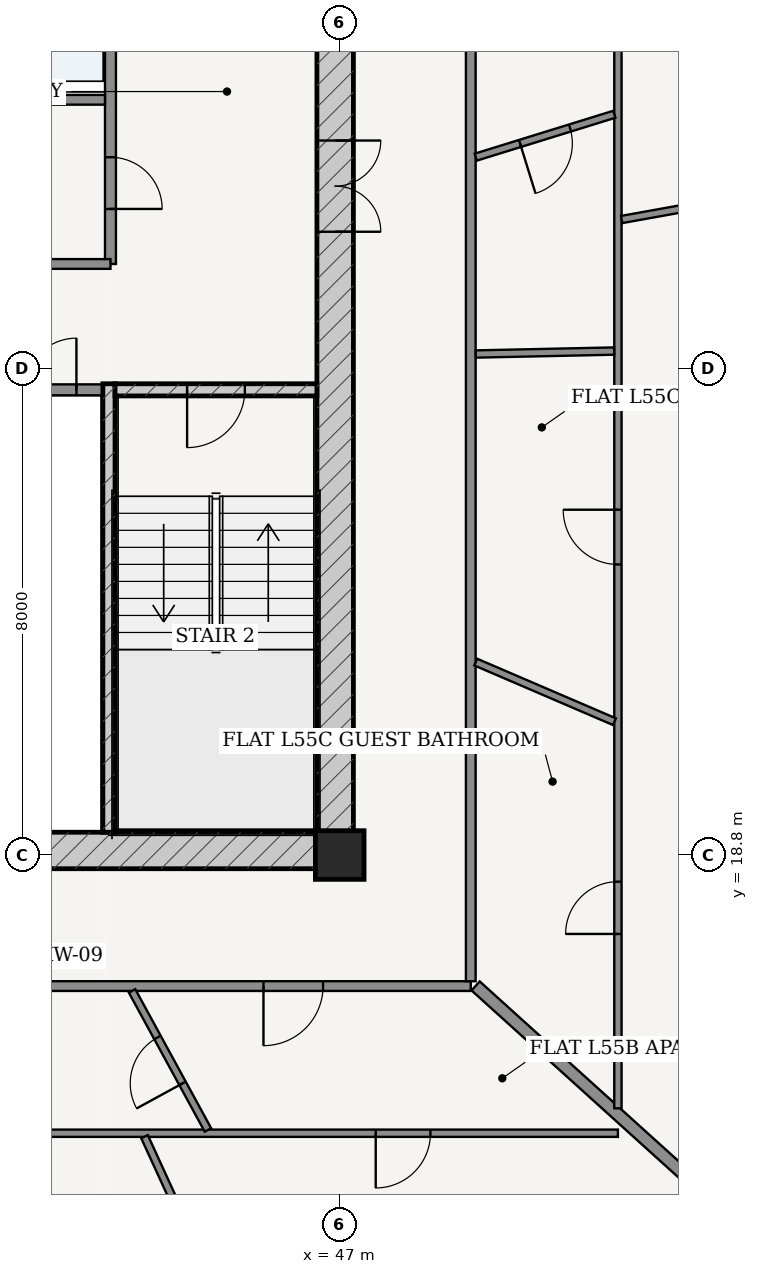
"""IFC4 building model, lengths in metres.
Left out: names, types, materials, properties, quantities, classifications, styles, units other than length and angle.
Written with IfcOpenShell. Run it as: python <this file> out.ifc"""

import sys

from ifc_helpers import new_model, si_unit, direction, frame, frame_2d, origin, origin_2d, place, context, subcontext, project, spatial, rectangle, extrude, source, transform, mapped, element, fill, save


model = new_model("IFC4")
c1 = context("Model", 3, precision=1e-05, world=origin(), true_north=direction((-0.2419218956, 0.970295726276)))
c2 = subcontext(c1, "Body", "Model", "MODEL_VIEW")
j1 = project(units=[si_unit("LENGTHUNIT", "METRE"), si_unit("PLANEANGLEUNIT", "RADIAN")], contexts=[c1])
p1 = place(None, origin())
s1 = spatial("IfcSite", under=j1, at=p1, CompositionType="ELEMENT")
p2 = place(p1, origin())
s2 = spatial("IfcBuilding", under=s1, at=p2, CompositionType="ELEMENT")
p3 = place(p2, frame((0.0, 0.0, 209.7)))
s3 = spatial("IfcBuildingStorey", under=s2, at=p3, CompositionType="ELEMENT", Elevation=209.7)
p4 = place(p3, frame((47.0, 18.8, 0.0), z_axis=(0.0, 0.0, 1.0), x_axis=(1.0, 0.0, 0.0)))
e1 = element("IfcColumn", 1, at=p4, inside=s3, PredefinedType="COLUMN", context=c2, shape_type="SweptSolid", body=[
    extrude(rectangle(XDim=0.8, YDim=0.8, at=origin_2d()), origin(), (0.0, 0.0, 1.0), 3.7),
])
p5 = place(p3, frame((28.775, 18.875, 0.0), z_axis=(0.0, 0.0, 1.0), x_axis=(1.0, 0.0, 0.0)))
e2 = element("IfcWall", 2, at=p5, inside=s3, PredefinedType="SHEAR", context=c2, shape_type="SweptSolid", body=[
    extrude(rectangle(XDim=18.45, YDim=0.6, at=frame_2d((9.225, 0.0))), origin(), (0.0, 0.0, 1.0), 3.435),
])
p6 = place(p5, frame((6.76, 0.0, 0.0)))
e3 = element("IfcOpeningElement", 3, at=p6, cuts=e2, PredefinedType="OPENING", context=c2, shape_type="SweptSolid", body=[
    extrude(rectangle(XDim=0.85, YDim=2.1, at=frame_2d((0.425, 1.05))), frame((0.0, 0.31, 0.0), z_axis=(0.0, -1.0, 0.0), x_axis=(1.0, 0.0, 0.0)), (0.0, 0.0, 1.0), 0.62),
])
p7 = place(p5, frame((8.8, 0.0, 0.0)))
e4 = element("IfcOpeningElement", 4, at=p7, cuts=e2, PredefinedType="OPENING", context=c2, shape_type="SweptSolid", body=[
    extrude(rectangle(XDim=0.85, YDim=2.1, at=frame_2d((0.425, 1.05))), frame((0.0, 0.31, 0.0), z_axis=(0.0, -1.0, 0.0), x_axis=(1.0, 0.0, 0.0)), (0.0, 0.0, 1.0), 0.62),
])
p8 = place(p5, frame((10.84, 0.0, 0.0)))
e5 = element("IfcOpeningElement", 5, at=p8, cuts=e2, PredefinedType="OPENING", context=c2, shape_type="SweptSolid", body=[
    extrude(rectangle(XDim=0.85, YDim=2.1, at=frame_2d((0.425, 1.05))), frame((0.0, 0.31, 0.0), z_axis=(0.0, -1.0, 0.0), x_axis=(1.0, 0.0, 0.0)), (0.0, 0.0, 1.0), 0.62),
])
p9 = place(p3, frame((46.925, 19.175, 0.0), z_axis=(0.0, 0.0, 1.0), x_axis=(0.0, 1.0, 0.0)))
e6 = element("IfcWall", 6, at=p9, inside=s3, PredefinedType="SHEAR", context=c2, shape_type="SweptSolid", body=[
    extrude(rectangle(XDim=15.25, YDim=0.6, at=frame_2d((7.625, 0.0))), origin(), (0.0, 0.0, 1.0), 3.435),
])
p10 = place(p9, frame((9.875, 0.0, 0.0)))
e7 = element("IfcOpeningElement", 7, at=p10, cuts=e6, PredefinedType="OPENING", context=c2, shape_type="SweptSolid", body=[
    extrude(rectangle(XDim=1.5, YDim=2.2, at=frame_2d((0.75, 1.1))), frame((0.0, 0.31, 0.0), z_axis=(0.0, -1.0, 0.0), x_axis=(1.0, 0.0, 0.0)), (0.0, 0.0, 1.0), 0.62),
])
p11 = place(p3, frame((43.205, 19.175, 0.0), z_axis=(0.0, 0.0, 1.0), x_axis=(0.0, 1.0, 0.0)))
e8 = element("IfcWall", 8, at=p11, inside=s3, PredefinedType="SOLIDWALL", context=c2, shape_type="SweptSolid", body=[
    extrude(rectangle(XDim=7.375, YDim=0.2, at=frame_2d((3.688, 0.0))), origin(), (0.0, 0.0, 1.0), 3.435),
])
p12 = place(p3, frame((43.305, 26.45, 0.0), z_axis=(0.0, 0.0, 1.0), x_axis=(1.0, 0.0, 0.0)))
e9 = element("IfcWall", 9, at=p12, inside=s3, PredefinedType="SOLIDWALL", context=c2, shape_type="SweptSolid", body=[
    extrude(rectangle(XDim=3.32, YDim=0.2, at=frame_2d((1.66, 0.0))), origin(), (0.0, 0.0, 1.0), 3.435),
])
p13 = place(p12, frame((1.185, 0.0, 0.0)))
e10 = element("IfcOpeningElement", 10, at=p13, cuts=e9, PredefinedType="OPENING", context=c2, shape_type="SweptSolid", body=[
    extrude(rectangle(XDim=0.95, YDim=2.15, at=frame_2d((0.475, 1.075))), frame((0.0, 0.11, 0.0), z_axis=(0.0, -1.0, 0.0), x_axis=(1.0, 0.0, 0.0)), (0.0, 0.0, 1.0), 0.22),
])
p14 = place(p3, frame((41.39, 26.45, 0.0), z_axis=(0.0, 0.0, 1.0), x_axis=(1.0, 0.0, 0.0)))
e11 = element("IfcWall", 11, at=p14, inside=s3, PredefinedType="PARTITIONING", context=c2, shape_type="SweptSolid", body=[
    extrude(rectangle(XDim=1.71, YDim=0.18, at=frame_2d((0.855, 0.0))), origin(), (0.0, 0.0, 1.0), 3.435),
])
p15 = place(p14, frame((0.43, 0.0, 0.0)))
e12 = element("IfcOpeningElement", 12, at=p15, cuts=e11, PredefinedType="OPENING", context=c2, shape_type="SweptSolid", body=[
    extrude(rectangle(XDim=0.85, YDim=2.1, at=frame_2d((0.425, 1.05))), frame((0.0, 0.1, 0.0), z_axis=(0.0, -1.0, 0.0), x_axis=(1.0, 0.0, 0.0)), (0.0, 0.0, 1.0), 0.2),
])
p16 = place(p3, frame((43.23, 28.52, 0.0), z_axis=(0.0, 0.0, 1.0), x_axis=(0.0, 1.0, 0.0)))
e13 = element("IfcWall", 13, at=p16, inside=s3, PredefinedType="PARTITIONING", context=c2, shape_type="SweptSolid", body=[
    extrude(rectangle(XDim=5.905, YDim=0.18, at=frame_2d((2.953, 0.0))), origin(), (0.0, 0.0, 1.0), 3.435),
])
p17 = place(p16, frame((0.905, 0.0, 0.0)))
e14 = element("IfcOpeningElement", 14, at=p17, cuts=e13, PredefinedType="OPENING", context=c2, shape_type="SweptSolid", body=[
    extrude(rectangle(XDim=0.85, YDim=2.1, at=frame_2d((0.425, 1.05))), frame((0.0, 0.1, 0.0), z_axis=(0.0, -1.0, 0.0), x_axis=(1.0, 0.0, 0.0)), (0.0, 0.0, 1.0), 0.2),
])
p18 = place(p16, frame((3.655, 0.0, 0.0)))
e15 = element("IfcOpeningElement", 15, at=p18, cuts=e13, PredefinedType="OPENING", context=c2, shape_type="SweptSolid", body=[
    extrude(rectangle(XDim=1.15, YDim=2.2, at=frame_2d((0.575, 1.1))), frame((0.0, 0.1, 0.0), z_axis=(0.0, -1.0, 0.0), x_axis=(1.0, 0.0, 0.0)), (0.0, 0.0, 1.0), 0.2),
])
p19 = place(p3, frame((41.39, 31.22, 0.0), z_axis=(0.0, 0.0, 1.0), x_axis=(1.0, 0.0, 0.0)))
e16 = element("IfcWall", 16, at=p19, inside=s3, PredefinedType="PARTITIONING", context=c2, shape_type="SweptSolid", body=[
    extrude(rectangle(XDim=1.75, YDim=0.16, at=frame_2d((0.875, 0.0))), origin(), (0.0, 0.0, 1.0), 3.435),
])
p20 = place(p3, frame((41.39, 28.52, 0.0), z_axis=(0.0, 0.0, 1.0), x_axis=(1.0, 0.0, 0.0)))
e17 = element("IfcWall", 17, at=p20, inside=s3, PredefinedType="PARTITIONING", context=c2, shape_type="SweptSolid", body=[
    extrude(rectangle(XDim=1.84, YDim=0.16, at=frame_2d((0.92, 0.0))), origin(), (0.0, 0.0, 1.0), 3.435),
])
p21 = place(p3, frame((34.32, 16.645, 0.0), z_axis=(0.0, 0.0, 1.0), x_axis=(1.0, 0.0, 0.0)))
e18 = element("IfcWall", 18, at=p21, inside=s3, PredefinedType="PARTITIONING", context=c2, shape_type="SweptSolid", body=[
    extrude(rectangle(XDim=14.835, YDim=0.16, at=frame_2d((7.417, 0.0))), origin(), (0.0, 0.0, 1.0), 2.951),
])
p22 = place(p21, frame((11.426, 0.0, 0.0)))
e19 = element("IfcOpeningElement", 19, at=p22, cuts=e18, PredefinedType="OPENING", context=c2, shape_type="SweptSolid", body=[
    extrude(rectangle(XDim=0.98, YDim=2.2, at=frame_2d((0.49, 1.1))), frame((0.0, 0.09, 0.0), z_axis=(0.0, -1.0, 0.0), x_axis=(1.0, 0.0, 0.0)), (0.0, 0.0, 1.0), 0.18),
])
p23 = place(p3, frame((49.155, 16.725, 0.0), z_axis=(0.0, 0.0, 1.0), x_axis=(0.0, 1.0, 0.0)))
e20 = element("IfcWall", 20, at=p23, inside=s3, PredefinedType="PARTITIONING", context=c2, shape_type="SweptSolid", body=[
    extrude(rectangle(XDim=18.3, YDim=0.16, at=frame_2d((9.15, 0.0))), origin(), (0.0, 0.0, 1.0), 2.951),
])
p24 = place(p23, frame((15.302, 0.0, 0.0)))
e21 = element("IfcOpeningElement", 21, at=p24, cuts=e20, PredefinedType="OPENING", context=c2, shape_type="SweptSolid", body=[
    extrude(rectangle(XDim=0.98, YDim=2.2, at=frame_2d((0.49, 1.1))), frame((0.0, 0.09, 0.0), z_axis=(0.0, -1.0, 0.0), x_axis=(1.0, 0.0, 0.0)), (0.0, 0.0, 1.0), 0.18),
])
p25 = place(p3, frame((51.575, 14.225, 0.0), z_axis=(0.0, 0.0, 1.0), x_axis=(-1.0, 0.0, 0.0)))
e22 = element("IfcWall", 22, at=p25, inside=s3, PredefinedType="PARTITIONING", context=c2, shape_type="SweptSolid", body=[
    extrude(rectangle(XDim=19.675, YDim=0.12, at=frame_2d((9.837, 0.0))), origin(), (0.0, 0.0, 1.0), 2.951),
])
p26 = place(p25, frame((3.083, 0.0, 0.0)))
e23 = element("IfcOpeningElement", 23, at=p26, cuts=e22, PredefinedType="OPENING", context=c2, shape_type="SweptSolid", body=[
    extrude(rectangle(XDim=0.9, YDim=2.15, at=frame_2d((0.45, 1.075))), frame((0.0, 0.07, 0.0), z_axis=(0.0, -1.0, 0.0), x_axis=(1.0, 0.0, 0.0)), (0.0, 0.0, 1.0), 0.14),
])
p27 = place(p25, frame((12.063, 0.0, 0.0)))
e24 = element("IfcOpeningElement", 24, at=p27, cuts=e22, PredefinedType="OPENING", context=c2, shape_type="SweptSolid", body=[
    extrude(rectangle(XDim=0.9, YDim=2.15, at=frame_2d((0.45, 1.075))), frame((0.0, 0.07, 0.0), z_axis=(0.0, -1.0, 0.0), x_axis=(1.0, 0.0, 0.0)), (0.0, 0.0, 1.0), 0.14),
])
p28 = place(p25, frame((17.777, 0.0, 0.0)))
e25 = element("IfcOpeningElement", 25, at=p28, cuts=e22, PredefinedType="OPENING", context=c2, shape_type="SweptSolid", body=[
    extrude(rectangle(XDim=0.9, YDim=2.15, at=frame_2d((0.45, 1.075))), frame((0.0, 0.07, 0.0), z_axis=(0.0, -1.0, 0.0), x_axis=(1.0, 0.0, 0.0)), (0.0, 0.0, 1.0), 0.14),
])
p29 = place(p3, frame((43.79, 14.169, 0.0), z_axis=(0.0, 0.0, 1.0), x_axis=(0.416687974363, -0.909049576218, 0.0)))
e26 = element("IfcWall", 26, at=p29, inside=s3, PredefinedType="PARTITIONING", context=c2, shape_type="SweptSolid", body=[
    extrude(rectangle(XDim=6.065, YDim=0.12, at=frame_2d((3.033, 0.0))), origin(), (0.0, 0.0, 1.0), 2.951),
])
p30 = place(p29, frame((2.583, 0.0, 0.0)))
e27 = element("IfcOpeningElement", 27, at=p30, cuts=e26, PredefinedType="OPENING", context=c2, shape_type="SweptSolid", body=[
    extrude(rectangle(XDim=0.9, YDim=2.15, at=frame_2d((0.45, 1.075))), frame((0.0, 0.07, 0.0), z_axis=(0.0, -1.0, 0.0), x_axis=(1.0, 0.0, 0.0)), (0.0, 0.0, 1.0), 0.14),
])
p31 = place(p3, frame((43.585, 16.565, 0.0), z_axis=(0.0, 0.0, 1.0), x_axis=(0.479068920965, -0.877777288932, 0.0)))
e28 = element("IfcWall", 28, at=p31, inside=s3, PredefinedType="PARTITIONING", context=c2, shape_type="SweptSolid", body=[
    extrude(rectangle(XDim=2.604, YDim=0.12, at=frame_2d((1.302, 0.0))), origin(), (0.0, 0.0, 1.0), 3.11),
])
p32 = place(p31, frame((0.872, 0.0, 0.0)))
e29 = element("IfcOpeningElement", 29, at=p32, cuts=e28, PredefinedType="OPENING", context=c2, shape_type="SweptSolid", body=[
    extrude(rectangle(XDim=0.86, YDim=2.15, at=frame_2d((0.43, 1.075))), frame((0.0, 0.07, 0.0), z_axis=(0.0, -1.0, 0.0), x_axis=(1.0, 0.0, 0.0)), (0.0, 0.0, 1.0), 0.14),
])
p33 = place(p3, frame((49.235, 16.647, 0.0), z_axis=(0.0, 0.0, 1.0), x_axis=(0.741935290449, -0.670471494387, 0.0)))
e30 = element("IfcWall", 30, at=p33, inside=s3, PredefinedType="PARTITIONING", context=c2, shape_type="SweptSolid", body=[
    extrude(rectangle(XDim=5.572, YDim=0.2, at=frame_2d((2.786, 0.0))), origin(), (0.0, 0.0, 1.0), 2.951),
])
p34 = place(p3, frame((51.575, 37.525, 0.0), z_axis=(0.0, 0.0, 1.0), x_axis=(0.0, -1.0, 0.0)))
e31 = element("IfcWall", 31, at=p34, inside=s3, PredefinedType="PARTITIONING", context=c2, shape_type="SweptSolid", body=[
    extrude(rectangle(XDim=22.89, YDim=0.12, at=frame_2d((11.445, 0.0))), origin(), (0.0, 0.0, 1.0), 2.951),
])
p35 = place(p34, frame((4.102, 0.0, 0.0)))
e32 = element("IfcOpeningElement", 32, at=p35, cuts=e31, PredefinedType="OPENING", context=c2, shape_type="SweptSolid", body=[
    extrude(rectangle(XDim=0.9, YDim=2.15, at=frame_2d((0.45, 1.075))), frame((0.0, 0.07, 0.0), z_axis=(0.0, -1.0, 0.0), x_axis=(1.0, 0.0, 0.0)), (0.0, 0.0, 1.0), 0.14),
])
p36 = place(p34, frame((19.163, 0.0, 0.0)))
e33 = element("IfcOpeningElement", 33, at=p36, cuts=e31, PredefinedType="OPENING", context=c2, shape_type="SweptSolid", body=[
    extrude(rectangle(XDim=0.86, YDim=2.15, at=frame_2d((0.43, 1.075))), frame((0.0, 0.07, 0.0), z_axis=(0.0, -1.0, 0.0), x_axis=(1.0, 0.0, 0.0)), (0.0, 0.0, 1.0), 0.14),
])
p37 = place(p34, frame((13.046, 0.0, 0.0)))
e34 = element("IfcOpeningElement", 34, at=p37, cuts=e31, PredefinedType="OPENING", context=c2, shape_type="SweptSolid", body=[
    extrude(rectangle(XDim=0.9, YDim=2.15, at=frame_2d((0.45, 1.075))), frame((0.0, 0.07, 0.0), z_axis=(0.0, -1.0, 0.0), x_axis=(1.0, 0.0, 0.0)), (0.0, 0.0, 1.0), 0.14),
])
p38 = place(p3, frame((51.636, 29.251, 0.0), z_axis=(0.0, 0.0, 1.0), x_axis=(0.984223216243, 0.176931231294, 0.0)))
e35 = element("IfcWall", 35, at=p38, inside=s3, PredefinedType="PARTITIONING", context=c2, shape_type="SweptSolid", body=[
    extrude(rectangle(XDim=7.763, YDim=0.12, at=frame_2d((3.882, 0.0))), origin(), (0.0, 0.0, 1.0), 2.951),
])
p39 = place(p38, frame((2.421, 0.0, 0.0)))
e36 = element("IfcOpeningElement", 36, at=p39, cuts=e35, PredefinedType="OPENING", context=c2, shape_type="SweptSolid", body=[
    extrude(rectangle(XDim=0.9, YDim=2.15, at=frame_2d((0.45, 1.075))), frame((0.0, 0.07, 0.0), z_axis=(0.0, -1.0, 0.0), x_axis=(1.0, 0.0, 0.0)), (0.0, 0.0, 1.0), 0.14),
])
p40 = place(p3, frame((49.237, 21.973, 0.0), z_axis=(0.0, 0.0, 1.0), x_axis=(0.91880901308, -0.394702416364, 0.0)))
e37 = element("IfcWall", 37, at=p40, inside=s3, PredefinedType="PARTITIONING", context=c2, shape_type="SweptSolid", body=[
    extrude(rectangle(XDim=2.483, YDim=0.12, at=frame_2d((1.241, 0.0))), origin(), (0.0, 0.0, 1.0), 3.11),
])
p41 = place(p3, frame((49.237, 27.039, 0.0), z_axis=(0.0, 0.0, 1.0), x_axis=(0.999772223164, 0.021342487922, 0.0)))
e38 = element("IfcWall", 38, at=p41, inside=s3, PredefinedType="PARTITIONING", context=c2, shape_type="SweptSolid", body=[
    extrude(rectangle(XDim=2.276, YDim=0.12, at=frame_2d((1.138, 0.0))), origin(), (0.0, 0.0, 1.0), 3.435),
])
p42 = place(p3, frame((49.237, 30.277, 0.0), z_axis=(0.0, 0.0, 1.0), x_axis=(0.955326488692, 0.295552533406, 0.0)))
e39 = element("IfcWall", 39, at=p42, inside=s3, PredefinedType="PARTITIONING", context=c2, shape_type="SweptSolid", body=[
    extrude(rectangle(XDim=2.386, YDim=0.12, at=frame_2d((1.193, 0.0))), origin(), (0.0, 0.0, 1.0), 3.435),
])
p43 = place(p42, frame((0.763, 0.0, 0.0)))
e40 = element("IfcOpeningElement", 40, at=p43, cuts=e39, PredefinedType="OPENING", context=c2, shape_type="SweptSolid", body=[
    extrude(rectangle(XDim=0.86, YDim=2.15, at=frame_2d((0.43, 1.075))), frame((0.0, 0.07, 0.0), z_axis=(0.0, -1.0, 0.0), x_axis=(1.0, 0.0, 0.0)), (0.0, 0.0, 1.0), 0.14),
])
m1 = source(origin(), c2, "Body", "SweptSolid", [
    extrude(rectangle(XDim=1.5, YDim=2.2, at=frame_2d((0.75, 1.1))), frame((0.0, 0.025, 0.0), z_axis=(0.0, -1.0, 0.0), x_axis=(1.0, 0.0, 0.0)), (0.0, 0.0, 1.0), 0.05),
])
p44 = place(p10, frame((1.5, 0.0, 0.0), z_axis=(0.0, 0.0, 1.0), x_axis=(-1.0, 0.0, 0.0)))
e41 = element("IfcDoor", 41, at=p44, inside=s3, OperationType="DOUBLE_DOOR_SINGLE_SWING", PredefinedType="DOOR", context=c2, shape_type="MappedRepresentation", body=[
    mapped(m1, transform((0.0, 0.0, 0.0), scale=1.0)),
])
fill(e7, e41)
m2 = source(origin(), c2, "Body", "SweptSolid", [
    extrude(rectangle(XDim=0.95, YDim=2.15, at=frame_2d((0.475, 1.075))), frame((0.0, 0.025, 0.0), z_axis=(0.0, -1.0, 0.0), x_axis=(1.0, 0.0, 0.0)), (0.0, 0.0, 1.0), 0.05),
])
p45 = place(p13, frame((0.95, 0.0, 0.0), z_axis=(0.0, 0.0, 1.0), x_axis=(-1.0, 0.0, 0.0)))
e42 = element("IfcDoor", 42, at=p45, inside=s3, OperationType="SINGLE_SWING_RIGHT", PredefinedType="DOOR", context=c2, shape_type="MappedRepresentation", body=[
    mapped(m2, transform((0.0, 0.0, 0.0), scale=1.0)),
])
fill(e10, e42)
m3 = source(origin(), c2, "Body", "SweptSolid", [
    extrude(rectangle(XDim=0.85, YDim=2.1, at=frame_2d((0.425, 1.05))), frame((0.0, 0.025, 0.0), z_axis=(0.0, -1.0, 0.0), x_axis=(1.0, 0.0, 0.0)), (0.0, 0.0, 1.0), 0.05),
])
p46 = place(p15, origin())
e43 = element("IfcDoor", 43, at=p46, inside=s3, OperationType="SINGLE_SWING_RIGHT", PredefinedType="DOOR", context=c2, shape_type="MappedRepresentation", body=[
    mapped(m3, transform((0.0, 0.0, 0.0), scale=1.0)),
])
fill(e12, e43)
p47 = place(p17, frame((0.85, 0.0, 0.0), z_axis=(0.0, 0.0, 1.0), x_axis=(-1.0, 0.0, 0.0)))
e44 = element("IfcDoor", 44, at=p47, inside=s3, OperationType="SINGLE_SWING_RIGHT", PredefinedType="DOOR", context=c2, shape_type="MappedRepresentation", body=[
    mapped(m3, transform((0.0, 0.0, 0.0), scale=1.0)),
])
fill(e14, e44)
m4 = source(origin(), c2, "Body", "SweptSolid", [
    extrude(rectangle(XDim=0.98, YDim=2.2, at=frame_2d((0.49, 1.1))), frame((0.0, 0.025, 0.0), z_axis=(0.0, -1.0, 0.0), x_axis=(1.0, 0.0, 0.0)), (0.0, 0.0, 1.0), 0.05),
])
p48 = place(p22, frame((0.98, 0.0, 0.0), z_axis=(0.0, 0.0, 1.0), x_axis=(-1.0, 0.0, 0.0)))
e45 = element("IfcDoor", 45, at=p48, inside=s3, OperationType="SINGLE_SWING_RIGHT", PredefinedType="DOOR", context=c2, shape_type="MappedRepresentation", body=[
    mapped(m4, transform((0.0, 0.0, 0.0), scale=1.0)),
])
fill(e19, e45)
m5 = source(origin(), c2, "Body", "SweptSolid", [
    extrude(rectangle(XDim=0.86, YDim=2.15, at=frame_2d((0.43, 1.075))), frame((0.0, 0.025, 0.0), z_axis=(0.0, -1.0, 0.0), x_axis=(1.0, 0.0, 0.0)), (0.0, 0.0, 1.0), 0.05),
])
p49 = place(p32, frame((0.86, 0.0, 0.0), z_axis=(0.0, 0.0, 1.0), x_axis=(-1.0, 0.0, 0.0)))
e46 = element("IfcDoor", 46, at=p49, inside=s3, OperationType="SINGLE_SWING_LEFT", PredefinedType="DOOR", context=c2, shape_type="MappedRepresentation", body=[
    mapped(m5, transform((0.0, 0.0, 0.0), scale=1.0)),
])
fill(e29, e46)
m6 = source(origin(), c2, "Body", "SweptSolid", [
    extrude(rectangle(XDim=0.9, YDim=2.15, at=frame_2d((0.45, 1.075))), frame((0.0, 0.025, 0.0), z_axis=(0.0, -1.0, 0.0), x_axis=(1.0, 0.0, 0.0)), (0.0, 0.0, 1.0), 0.05),
])
p50 = place(p26, origin())
e47 = element("IfcDoor", 47, at=p50, inside=s3, OperationType="SINGLE_SWING_RIGHT", PredefinedType="DOOR", context=c2, shape_type="MappedRepresentation", body=[
    mapped(m6, transform((0.0, 0.0, 0.0), scale=1.0)),
])
fill(e23, e47)
p51 = place(p43, frame((0.86, 0.0, 0.0), z_axis=(0.0, 0.0, 1.0), x_axis=(-1.0, 0.0, 0.0)))
e48 = element("IfcDoor", 48, at=p51, inside=s3, OperationType="SINGLE_SWING_RIGHT", PredefinedType="DOOR", context=c2, shape_type="MappedRepresentation", body=[
    mapped(m5, transform((0.0, 0.0, 0.0), scale=1.0)),
])
fill(e40, e48)
p52 = place(p36, frame((0.86, 0.0, 0.0), z_axis=(0.0, 0.0, 1.0), x_axis=(-1.0, 0.0, 0.0)))
e49 = element("IfcDoor", 49, at=p52, inside=s3, OperationType="SINGLE_SWING_LEFT", PredefinedType="DOOR", context=c2, shape_type="MappedRepresentation", body=[
    mapped(m5, transform((0.0, 0.0, 0.0), scale=1.0)),
])
fill(e33, e49)
p53 = place(p37, frame((0.9, 0.0, 0.0), z_axis=(0.0, 0.0, 1.0), x_axis=(-1.0, 0.0, 0.0)))
e50 = element("IfcDoor", 50, at=p53, inside=s3, OperationType="SINGLE_SWING_RIGHT", PredefinedType="DOOR", context=c2, shape_type="MappedRepresentation", body=[
    mapped(m6, transform((0.0, 0.0, 0.0), scale=1.0)),
])
fill(e34, e50)
save(model, sys.argv[1])
